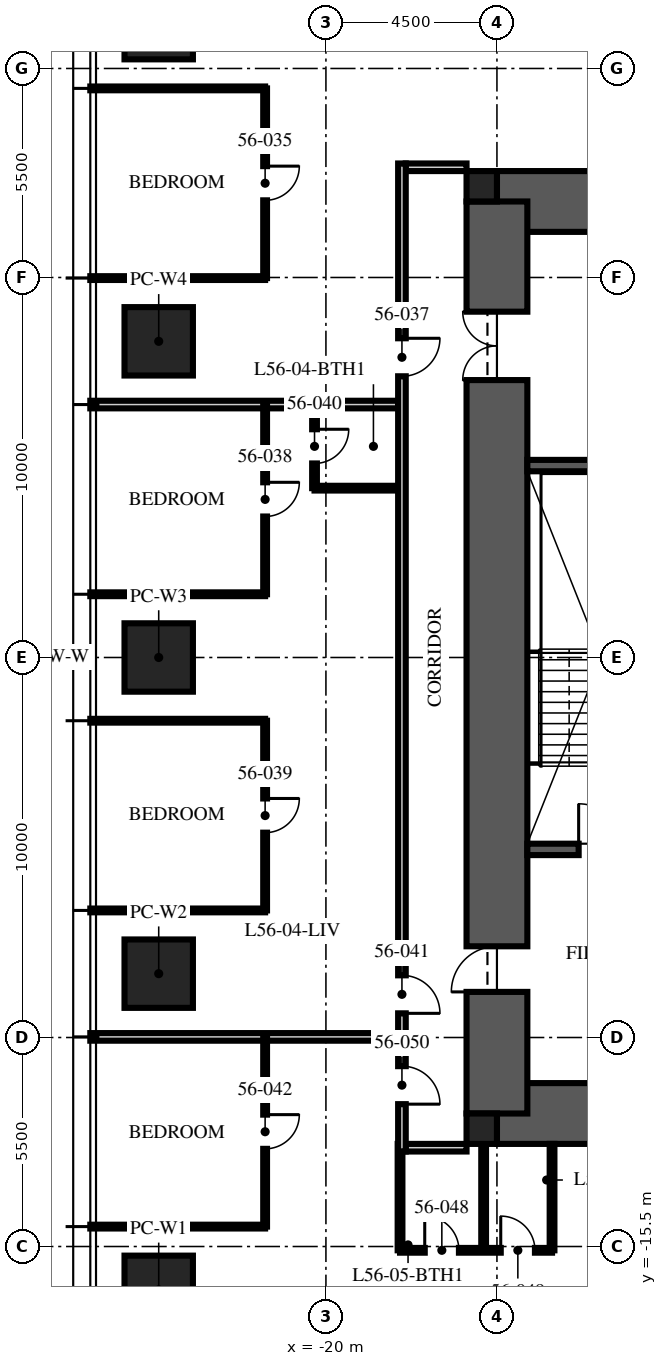
"""IFC4 building model, lengths in metres.
Left out: names, types, materials, properties, quantities, classifications, styles, units other than length and angle.
Written with IfcOpenShell. Run it as: python <this file> out.ifc"""

import sys

from ifc_helpers import new_model, si_unit, direction, frame, frame_2d, origin, origin_2d, place, context, subcontext, project, spatial, rectangle, extrude, element, fill, save


model = new_model("IFC4")
c1 = context("Model", 3, precision=1e-05, world=origin(), true_north=direction((0.0, 1.0)))
c2 = subcontext(c1, "Body", "Model", "MODEL_VIEW")
j1 = project(units=[si_unit("LENGTHUNIT", "METRE"), si_unit("PLANEANGLEUNIT", "RADIAN")], contexts=[c1])
p1 = place(None, origin())
s1 = spatial("IfcSite", under=j1, at=p1, CompositionType="ELEMENT")
p2 = place(p1, origin())
s2 = spatial("IfcBuilding", under=s1, at=p2, CompositionType="ELEMENT")
p3 = place(p2, frame((0.0, 0.0, 225.75)))
s3 = spatial("IfcBuildingStorey", under=s2, at=p3, CompositionType="ELEMENT", Elevation=225.75)
for number, where, z_axis, x_axis in (
    (1, (-15.5, 12.0, -0.25), (0.0, 0.0, 1.0), (1.0, 0.0, 0.0)),
    (2, (-15.5, -12.0, -0.25), (0.0, 0.0, 1.0), (1.0, 0.0, 0.0)),
):
    element("IfcWall", number, at=place(p3, frame(where, z_axis=z_axis, x_axis=x_axis)), inside=s3, PredefinedType="SHEAR", context=c2, shape_type="SweptSolid", body=[
        extrude(rectangle(XDim=31.0, YDim=1.6, at=frame_2d((15.5, 0.0))), origin(), (0.0, 0.0, 1.0), 3.75),
    ])
p4 = place(p3, frame((-15.5, -12.0, -0.25), z_axis=(0.0, 0.0, 1.0), x_axis=(0.0, 1.0, 0.0)))
e3 = element("IfcWall", 3, at=p4, inside=s3, PredefinedType="SHEAR", context=c2, shape_type="SweptSolid", body=[
    extrude(rectangle(XDim=24.0, YDim=1.6, at=frame_2d((12.0, 0.0))), origin(), (0.0, 0.0, 1.0), 3.75),
])
p5 = place(p4, frame((3.2, 0.0, 0.25)))
e4 = element("IfcOpeningElement", 4, at=p5, cuts=e3, PredefinedType="OPENING", context=c2, shape_type="SweptSolid", body=[
    extrude(rectangle(XDim=1.2, YDim=2.1, at=frame_2d((0.6, 1.05))), frame((0.0, 0.81, 0.0), z_axis=(0.0, -1.0, 0.0), x_axis=(1.0, 0.0, 0.0)), (0.0, 0.0, 1.0), 1.62),
])
p6 = place(p4, frame((19.3, 0.0, 0.25)))
e5 = element("IfcOpeningElement", 5, at=p6, cuts=e3, PredefinedType="OPENING", context=c2, shape_type="SweptSolid", body=[
    extrude(rectangle(XDim=1.8, YDim=2.1, at=frame_2d((0.9, 1.05))), frame((0.0, 0.81, 0.0), z_axis=(0.0, -1.0, 0.0), x_axis=(1.0, 0.0, 0.0)), (0.0, 0.0, 1.0), 1.62),
])
for number, where, z_axis, x_axis in (
    (6, (-15.9, 12.4, -0.25), (0.0, 0.0, 1.0), (1.0, 0.0, 0.0)),
    (7, (-15.9, -12.4, -0.25), (0.0, 0.0, 1.0), (1.0, 0.0, 0.0)),
):
    element("IfcColumn", number, at=place(p3, frame(where, z_axis=z_axis, x_axis=x_axis)), inside=s3, PredefinedType="COLUMN", context=c2, shape_type="SweptSolid", body=[
        extrude(rectangle(XDim=0.8, YDim=0.8, at=origin_2d()), origin(), (0.0, 0.0, 1.0), 3.75),
    ])
for number, where, z_axis, x_axis in (
    (8, (-24.4, -16.64, 0.0), (0.0, 0.0, 1.0), (0.0, 1.0, 0.0)),
    (9, (-24.4, -8.32, 0.0), (0.0, 0.0, 1.0), (0.0, 1.0, 0.0)),
    (10, (-24.4, 0.0, 0.0), (0.0, 0.0, 1.0), (0.0, 1.0, 0.0)),
    (11, (-24.4, 8.32, 0.0), (0.0, 0.0, 1.0), (0.0, 1.0, 0.0)),
    (12, (-24.4, 16.64, 0.0), (0.0, 0.0, 1.0), (0.0, 1.0, 0.0)),
):
    element("IfcColumn", number, at=place(p3, frame(where, z_axis=z_axis, x_axis=x_axis)), inside=s3, PredefinedType="COLUMN", context=c2, shape_type="SweptSolid", body=[
        extrude(rectangle(XDim=1.8, YDim=1.8, at=origin_2d()), origin(), (0.0, 0.0, 1.0), 3.75),
    ])
p7 = place(p3, frame((-14.7, -5.05, 0.0), z_axis=(0.0, 0.0, 1.0), x_axis=(1.0, 0.0, 0.0)))
e13 = element("IfcWall", 13, at=p7, inside=s3, PredefinedType="SOLIDWALL", context=c2, shape_type="SweptSolid", body=[
    extrude(rectangle(XDim=5.9, YDim=0.3, at=frame_2d((2.95, 0.0))), origin(), (0.0, 0.0, 1.0), 3.5),
])
p8 = place(p7, frame((1.35, 0.0, 0.0)))
e14 = element("IfcOpeningElement", 14, at=p8, cuts=e13, PredefinedType="OPENING", context=c2, shape_type="SweptSolid", body=[
    extrude(rectangle(XDim=1.2, YDim=2.1, at=frame_2d((0.6, 1.05))), frame((0.0, 0.16, 0.0), z_axis=(0.0, -1.0, 0.0), x_axis=(1.0, 0.0, 0.0)), (0.0, 0.0, 1.0), 0.32),
])
p9 = place(p3, frame((-14.7, 5.05, 0.0), z_axis=(0.0, 0.0, 1.0), x_axis=(1.0, 0.0, 0.0)))
e15 = element("IfcWall", 15, at=p9, inside=s3, PredefinedType="SOLIDWALL", context=c2, shape_type="SweptSolid", body=[
    extrude(rectangle(XDim=3.9, YDim=0.3, at=frame_2d((1.95, 0.0))), origin(), (0.0, 0.0, 1.0), 3.5),
])
for number, where, z_axis, x_axis in (
    (16, (-16.3, 12.9, 0.0), (0.0, 0.0, 1.0), (-1.0, 0.0, 0.0)),
    (17, (-16.3, -12.9, 0.0), (0.0, 0.0, 1.0), (-1.0, 0.0, 0.0)),
):
    element("IfcWall", number, at=place(p3, frame(where, z_axis=z_axis, x_axis=x_axis)), inside=s3, PredefinedType="PARTITIONING", context=c2, shape_type="SweptSolid", body=[
        extrude(rectangle(XDim=1.6, YDim=0.2, at=frame_2d((0.8, 0.0))), origin(), (0.0, 0.0, 1.0), 2.3),
    ])
for number, where, z_axis, x_axis in (
    (18, (-21.6, 14.976, 0.0), (0.0, 0.0, 1.0), (-1.0, 0.0, 0.0)),
    (19, (-21.6, 9.984, 0.0), (0.0, 0.0, 1.0), (-1.0, 0.0, 0.0)),
):
    element("IfcWall", number, at=place(p3, frame(where, z_axis=z_axis, x_axis=x_axis)), inside=s3, PredefinedType="PARTITIONING", context=c2, shape_type="SweptSolid", body=[
        extrude(rectangle(XDim=4.6, YDim=0.1, at=frame_2d((2.3, 0.0))), origin(), (0.0, 0.0, 1.0), 2.91),
    ])
p10 = place(p3, frame((-18.1, 6.656, 0.0), z_axis=(0.0, 0.0, 1.0), x_axis=(-1.0, 0.0, 0.0)))
e20 = element("IfcWall", 20, at=p10, inside=s3, PredefinedType="PARTITIONING", context=c2, shape_type="SweptSolid", body=[
    extrude(rectangle(XDim=8.1, YDim=0.2, at=frame_2d((4.05, 0.0))), origin(), (0.0, 0.0, 1.0), 2.91),
])
for number, where, z_axis, x_axis in (
    (21, (-21.6, 1.664, 0.0), (0.0, 0.0, 1.0), (-1.0, 0.0, 0.0)),
    (22, (-21.6, -1.664, 0.0), (0.0, 0.0, 1.0), (-1.0, 0.0, 0.0)),
    (23, (-21.6, -6.656, 0.0), (0.0, 0.0, 1.0), (-1.0, 0.0, 0.0)),
):
    element("IfcWall", number, at=place(p3, frame(where, z_axis=z_axis, x_axis=x_axis)), inside=s3, PredefinedType="PARTITIONING", context=c2, shape_type="SweptSolid", body=[
        extrude(rectangle(XDim=4.6, YDim=0.1, at=frame_2d((2.3, 0.0))), origin(), (0.0, 0.0, 1.0), 2.91),
    ])
p11 = place(p3, frame((-18.1, -9.984, 0.0), z_axis=(0.0, 0.0, 1.0), x_axis=(-1.0, 0.0, 0.0)))
e24 = element("IfcWall", 24, at=p11, inside=s3, PredefinedType="PARTITIONING", context=c2, shape_type="SweptSolid", body=[
    extrude(rectangle(XDim=8.1, YDim=0.2, at=frame_2d((4.05, 0.0))), origin(), (0.0, 0.0, 1.0), 2.91),
])
p12 = place(p3, frame((-21.6, -14.976, 0.0), z_axis=(0.0, 0.0, 1.0), x_axis=(-1.0, 0.0, 0.0)))
e25 = element("IfcWall", 25, at=p12, inside=s3, PredefinedType="PARTITIONING", context=c2, shape_type="SweptSolid", body=[
    extrude(rectangle(XDim=4.6, YDim=0.1, at=frame_2d((2.3, 0.0))), origin(), (0.0, 0.0, 1.0), 2.91),
])
p13 = place(p3, frame((-21.6, 14.976, 0.0), z_axis=(0.0, 0.0, 1.0), x_axis=(0.0, -1.0, 0.0)))
e26 = element("IfcWall", 26, at=p13, inside=s3, PredefinedType="PARTITIONING", context=c2, shape_type="SweptSolid", body=[
    extrude(rectangle(XDim=4.992, YDim=0.1, at=frame_2d((2.496, 0.0))), origin(), (0.0, 0.0, 1.0), 2.81),
])
p14 = place(p13, frame((2.046, 0.0, 0.0)))
e27 = element("IfcOpeningElement", 27, at=p14, cuts=e26, PredefinedType="OPENING", context=c2, shape_type="SweptSolid", body=[
    extrude(rectangle(XDim=0.9, YDim=2.1, at=frame_2d((0.45, 1.05))), frame((0.0, 0.06, 0.0), z_axis=(0.0, -1.0, 0.0), x_axis=(1.0, 0.0, 0.0)), (0.0, 0.0, 1.0), 0.12),
])
p15 = place(p3, frame((-21.6, 6.656, 0.0), z_axis=(0.0, 0.0, 1.0), x_axis=(0.0, -1.0, 0.0)))
e28 = element("IfcWall", 28, at=p15, inside=s3, PredefinedType="PARTITIONING", context=c2, shape_type="SweptSolid", body=[
    extrude(rectangle(XDim=4.992, YDim=0.1, at=frame_2d((2.496, 0.0))), origin(), (0.0, 0.0, 1.0), 2.81),
])
p16 = place(p15, frame((2.046, 0.0, 0.0)))
e29 = element("IfcOpeningElement", 29, at=p16, cuts=e28, PredefinedType="OPENING", context=c2, shape_type="SweptSolid", body=[
    extrude(rectangle(XDim=0.9, YDim=2.1, at=frame_2d((0.45, 1.05))), frame((0.0, 0.06, 0.0), z_axis=(0.0, -1.0, 0.0), x_axis=(1.0, 0.0, 0.0)), (0.0, 0.0, 1.0), 0.12),
])
p17 = place(p3, frame((-21.6, -1.664, 0.0), z_axis=(0.0, 0.0, 1.0), x_axis=(0.0, -1.0, 0.0)))
e30 = element("IfcWall", 30, at=p17, inside=s3, PredefinedType="PARTITIONING", context=c2, shape_type="SweptSolid", body=[
    extrude(rectangle(XDim=4.992, YDim=0.1, at=frame_2d((2.496, 0.0))), origin(), (0.0, 0.0, 1.0), 2.81),
])
p18 = place(p17, frame((2.046, 0.0, 0.0)))
e31 = element("IfcOpeningElement", 31, at=p18, cuts=e30, PredefinedType="OPENING", context=c2, shape_type="SweptSolid", body=[
    extrude(rectangle(XDim=0.9, YDim=2.1, at=frame_2d((0.45, 1.05))), frame((0.0, 0.06, 0.0), z_axis=(0.0, -1.0, 0.0), x_axis=(1.0, 0.0, 0.0)), (0.0, 0.0, 1.0), 0.12),
])
p19 = place(p3, frame((-20.3, 6.656, 0.0), z_axis=(0.0, 0.0, 1.0), x_axis=(0.0, -1.0, 0.0)))
e32 = element("IfcWall", 32, at=p19, inside=s3, PredefinedType="PARTITIONING", context=c2, shape_type="SweptSolid", body=[
    extrude(rectangle(XDim=2.2, YDim=0.125, at=frame_2d((1.1, 0.0))), origin(), (0.0, 0.0, 1.0), 3.5),
])
p20 = place(p19, frame((0.65, 0.0, 0.0)))
e33 = element("IfcOpeningElement", 33, at=p20, cuts=e32, PredefinedType="OPENING", context=c2, shape_type="SweptSolid", body=[
    extrude(rectangle(XDim=0.9, YDim=2.1, at=frame_2d((0.45, 1.05))), frame((0.0, 0.073, 0.0), z_axis=(0.0, -1.0, 0.0), x_axis=(1.0, 0.0, 0.0)), (0.0, 0.0, 1.0), 0.145),
])
p21 = place(p3, frame((-18.1, 4.456, 0.0), z_axis=(0.0, 0.0, 1.0), x_axis=(-1.0, 0.0, 0.0)))
e34 = element("IfcWall", 34, at=p21, inside=s3, PredefinedType="PARTITIONING", context=c2, shape_type="SweptSolid", body=[
    extrude(rectangle(XDim=2.2, YDim=0.125, at=frame_2d((1.1, 0.0))), origin(), (0.0, 0.0, 1.0), 3.5),
])
p22 = place(p3, frame((-21.6, -9.984, 0.0), z_axis=(0.0, 0.0, 1.0), x_axis=(0.0, -1.0, 0.0)))
e35 = element("IfcWall", 35, at=p22, inside=s3, PredefinedType="PARTITIONING", context=c2, shape_type="SweptSolid", body=[
    extrude(rectangle(XDim=4.992, YDim=0.1, at=frame_2d((2.496, 0.0))), origin(), (0.0, 0.0, 1.0), 2.81),
])
p23 = place(p22, frame((2.046, 0.0, 0.0)))
e36 = element("IfcOpeningElement", 36, at=p23, cuts=e35, PredefinedType="OPENING", context=c2, shape_type="SweptSolid", body=[
    extrude(rectangle(XDim=0.9, YDim=2.1, at=frame_2d((0.45, 1.05))), frame((0.0, 0.06, 0.0), z_axis=(0.0, -1.0, 0.0), x_axis=(1.0, 0.0, 0.0)), (0.0, 0.0, 1.0), 0.12),
])
p24 = place(p3, frame((-18.05, -15.6, 0.0), z_axis=(0.0, 0.0, 1.0), x_axis=(1.0, 0.0, 0.0)))
e37 = element("IfcWall", 37, at=p24, inside=s3, PredefinedType="PARTITIONING", context=c2, shape_type="SweptSolid", body=[
    extrude(rectangle(XDim=4.0, YDim=0.125, at=frame_2d((2.0, 0.0))), origin(), (0.0, 0.0, 1.0), 2.3),
])
p25 = place(p24, frame((0.65, 0.0, 0.0)))
e38 = element("IfcOpeningElement", 38, at=p25, cuts=e37, PredefinedType="OPENING", context=c2, shape_type="SweptSolid", body=[
    extrude(rectangle(XDim=0.9, YDim=2.1, at=frame_2d((0.45, 1.05))), frame((0.0, 0.073, 0.0), z_axis=(0.0, -1.0, 0.0), x_axis=(1.0, 0.0, 0.0)), (0.0, 0.0, 1.0), 0.145),
])
p26 = place(p24, frame((2.65, 0.0, 0.0)))
e39 = element("IfcOpeningElement", 39, at=p26, cuts=e37, PredefinedType="OPENING", context=c2, shape_type="SweptSolid", body=[
    extrude(rectangle(XDim=0.9, YDim=2.1, at=frame_2d((0.45, 1.05))), frame((0.0, 0.073, 0.0), z_axis=(0.0, -1.0, 0.0), x_axis=(1.0, 0.0, 0.0)), (0.0, 0.0, 1.0), 0.145),
])
for number, where, z_axis, x_axis in (
    (40, (-18.05, -12.8, 0.0), (0.0, 0.0, 1.0), (0.0, -1.0, 0.0)),
    (41, (-15.85, -12.8, 0.0), (0.0, 0.0, 1.0), (0.0, -1.0, 0.0)),
):
    element("IfcWall", number, at=place(p3, frame(where, z_axis=z_axis, x_axis=x_axis)), inside=s3, PredefinedType="PARTITIONING", context=c2, shape_type="SweptSolid", body=[
        extrude(rectangle(XDim=2.8, YDim=0.125, at=frame_2d((1.4, 0.0))), origin(), (0.0, 0.0, 1.0), 2.3),
    ])
p27 = place(p3, frame((-14.05, -12.8, 0.0), z_axis=(0.0, 0.0, 1.0), x_axis=(0.0, -1.0, 0.0)))
e42 = element("IfcWall", 42, at=p27, inside=s3, PredefinedType="PARTITIONING", context=c2, shape_type="SweptSolid", body=[
    extrude(rectangle(XDim=2.8, YDim=0.125, at=frame_2d((1.4, 0.0))), origin(), (0.0, 0.0, 1.0), 3.5),
])
p28 = place(p3, frame((-18.0, 13.0, 0.0), z_axis=(0.0, 0.0, 1.0), x_axis=(0.0, -1.0, 0.0)))
e43 = element("IfcWall", 43, at=p28, inside=s3, PredefinedType="PARTITIONING", context=c2, shape_type="SweptSolid", body=[
    extrude(rectangle(XDim=26.0, YDim=0.2, at=frame_2d((13.0, 0.0))), origin(), (0.0, 0.0, 1.0), 2.6),
])
p29 = place(p28, frame((4.6, 0.0, 0.0)))
e44 = element("IfcOpeningElement", 44, at=p29, cuts=e43, PredefinedType="OPENING", context=c2, shape_type="SweptSolid", body=[
    extrude(rectangle(XDim=1.0, YDim=2.2, at=frame_2d((0.5, 1.1))), frame((0.0, 0.11, 0.0), z_axis=(0.0, -1.0, 0.0), x_axis=(1.0, 0.0, 0.0)), (0.0, 0.0, 1.0), 0.22),
])
p30 = place(p28, frame((21.364, 0.0, 0.0)))
e45 = element("IfcOpeningElement", 45, at=p30, cuts=e43, PredefinedType="OPENING", context=c2, shape_type="SweptSolid", body=[
    extrude(rectangle(XDim=1.0, YDim=2.2, at=frame_2d((0.5, 1.1))), frame((0.0, 0.11, 0.0), z_axis=(0.0, -1.0, 0.0), x_axis=(1.0, 0.0, 0.0)), (0.0, 0.0, 1.0), 0.22),
])
p31 = place(p28, frame((23.754, 0.0, 0.0)))
e46 = element("IfcOpeningElement", 46, at=p31, cuts=e43, PredefinedType="OPENING", context=c2, shape_type="SweptSolid", body=[
    extrude(rectangle(XDim=1.0, YDim=2.2, at=frame_2d((0.5, 1.1))), frame((0.0, 0.11, 0.0), z_axis=(0.0, -1.0, 0.0), x_axis=(1.0, 0.0, 0.0)), (0.0, 0.0, 1.0), 0.22),
])
p32 = place(p8, origin())
e47 = element("IfcDoor", 47, at=p32, inside=s3, OperationType="SINGLE_SWING_LEFT", PredefinedType="DOOR", context=c2, shape_type="SweptSolid", body=[
    extrude(rectangle(XDim=1.2, YDim=2.1, at=frame_2d((0.6, 1.05))), frame((0.0, 0.025, 0.0), z_axis=(0.0, -1.0, 0.0), x_axis=(1.0, 0.0, 0.0)), (0.0, 0.0, 1.0), 0.05),
])
fill(e14, e47)
p33 = place(p5, origin())
e48 = element("IfcDoor", 48, at=p33, inside=s3, OperationType="SINGLE_SWING_LEFT", PredefinedType="DOOR", context=c2, shape_type="SweptSolid", body=[
    extrude(rectangle(XDim=1.2, YDim=2.1, at=frame_2d((0.6, 1.05))), frame((0.0, 0.025, 0.0), z_axis=(0.0, -1.0, 0.0), x_axis=(1.0, 0.0, 0.0)), (0.0, 0.0, 1.0), 0.05),
])
fill(e4, e48)
p34 = place(p6, origin())
e49 = element("IfcDoor", 49, at=p34, inside=s3, OperationType="DOUBLE_DOOR_SINGLE_SWING", PredefinedType="DOOR", context=c2, shape_type="SweptSolid", body=[
    extrude(rectangle(XDim=1.8, YDim=2.1, at=frame_2d((0.9, 1.05))), frame((0.0, 0.025, 0.0), z_axis=(0.0, -1.0, 0.0), x_axis=(1.0, 0.0, 0.0)), (0.0, 0.0, 1.0), 0.05),
])
fill(e5, e49)
p35 = place(p14, origin())
e50 = element("IfcDoor", 50, at=p35, inside=s3, OperationType="SINGLE_SWING_LEFT", PredefinedType="DOOR", context=c2, shape_type="SweptSolid", body=[
    extrude(rectangle(XDim=0.9, YDim=2.1, at=frame_2d((0.45, 1.05))), frame((0.0, 0.025, 0.0), z_axis=(0.0, -1.0, 0.0), x_axis=(1.0, 0.0, 0.0)), (0.0, 0.0, 1.0), 0.05),
])
fill(e27, e50)
p36 = place(p29, origin())
e51 = element("IfcDoor", 51, at=p36, inside=s3, OperationType="SINGLE_SWING_LEFT", PredefinedType="DOOR", context=c2, shape_type="SweptSolid", body=[
    extrude(rectangle(XDim=1.0, YDim=2.2, at=frame_2d((0.5, 1.1))), frame((0.0, 0.025, 0.0), z_axis=(0.0, -1.0, 0.0), x_axis=(1.0, 0.0, 0.0)), (0.0, 0.0, 1.0), 0.05),
])
fill(e44, e51)
p37 = place(p16, origin())
e52 = element("IfcDoor", 52, at=p37, inside=s3, OperationType="SINGLE_SWING_LEFT", PredefinedType="DOOR", context=c2, shape_type="SweptSolid", body=[
    extrude(rectangle(XDim=0.9, YDim=2.1, at=frame_2d((0.45, 1.05))), frame((0.0, 0.025, 0.0), z_axis=(0.0, -1.0, 0.0), x_axis=(1.0, 0.0, 0.0)), (0.0, 0.0, 1.0), 0.05),
])
fill(e29, e52)
p38 = place(p18, origin())
e53 = element("IfcDoor", 53, at=p38, inside=s3, OperationType="SINGLE_SWING_LEFT", PredefinedType="DOOR", context=c2, shape_type="SweptSolid", body=[
    extrude(rectangle(XDim=0.9, YDim=2.1, at=frame_2d((0.45, 1.05))), frame((0.0, 0.025, 0.0), z_axis=(0.0, -1.0, 0.0), x_axis=(1.0, 0.0, 0.0)), (0.0, 0.0, 1.0), 0.05),
])
fill(e31, e53)
p39 = place(p20, origin())
e54 = element("IfcDoor", 54, at=p39, inside=s3, OperationType="SINGLE_SWING_LEFT", PredefinedType="DOOR", context=c2, shape_type="SweptSolid", body=[
    extrude(rectangle(XDim=0.9, YDim=2.1, at=frame_2d((0.45, 1.05))), frame((0.0, 0.025, 0.0), z_axis=(0.0, -1.0, 0.0), x_axis=(1.0, 0.0, 0.0)), (0.0, 0.0, 1.0), 0.05),
])
fill(e33, e54)
p40 = place(p30, origin())
e55 = element("IfcDoor", 55, at=p40, inside=s3, OperationType="SINGLE_SWING_RIGHT", PredefinedType="DOOR", context=c2, shape_type="SweptSolid", body=[
    extrude(rectangle(XDim=1.0, YDim=2.2, at=frame_2d((0.5, 1.1))), frame((0.0, 0.025, 0.0), z_axis=(0.0, -1.0, 0.0), x_axis=(1.0, 0.0, 0.0)), (0.0, 0.0, 1.0), 0.05),
])
fill(e45, e55)
p41 = place(p23, origin())
e56 = element("IfcDoor", 56, at=p41, inside=s3, OperationType="SINGLE_SWING_LEFT", PredefinedType="DOOR", context=c2, shape_type="SweptSolid", body=[
    extrude(rectangle(XDim=0.9, YDim=2.1, at=frame_2d((0.45, 1.05))), frame((0.0, 0.025, 0.0), z_axis=(0.0, -1.0, 0.0), x_axis=(1.0, 0.0, 0.0)), (0.0, 0.0, 1.0), 0.05),
])
fill(e36, e56)
p42 = place(p25, origin())
e57 = element("IfcDoor", 57, at=p42, inside=s3, OperationType="SINGLE_SWING_LEFT", PredefinedType="DOOR", context=c2, shape_type="SweptSolid", body=[
    extrude(rectangle(XDim=0.9, YDim=2.1, at=frame_2d((0.45, 1.05))), frame((0.0, 0.025, 0.0), z_axis=(0.0, -1.0, 0.0), x_axis=(1.0, 0.0, 0.0)), (0.0, 0.0, 1.0), 0.05),
])
fill(e38, e57)
p43 = place(p26, origin())
e58 = element("IfcDoor", 58, at=p43, inside=s3, OperationType="SINGLE_SWING_LEFT", PredefinedType="DOOR", context=c2, shape_type="SweptSolid", body=[
    extrude(rectangle(XDim=0.9, YDim=2.1, at=frame_2d((0.45, 1.05))), frame((0.0, 0.025, 0.0), z_axis=(0.0, -1.0, 0.0), x_axis=(1.0, 0.0, 0.0)), (0.0, 0.0, 1.0), 0.05),
])
fill(e39, e58)
p44 = place(p31, origin())
e59 = element("IfcDoor", 59, at=p44, inside=s3, OperationType="SINGLE_SWING_RIGHT", PredefinedType="DOOR", context=c2, shape_type="SweptSolid", body=[
    extrude(rectangle(XDim=1.0, YDim=2.2, at=frame_2d((0.5, 1.1))), frame((0.0, 0.025, 0.0), z_axis=(0.0, -1.0, 0.0), x_axis=(1.0, 0.0, 0.0)), (0.0, 0.0, 1.0), 0.05),
])
fill(e46, e59)
save(model, sys.argv[1])
